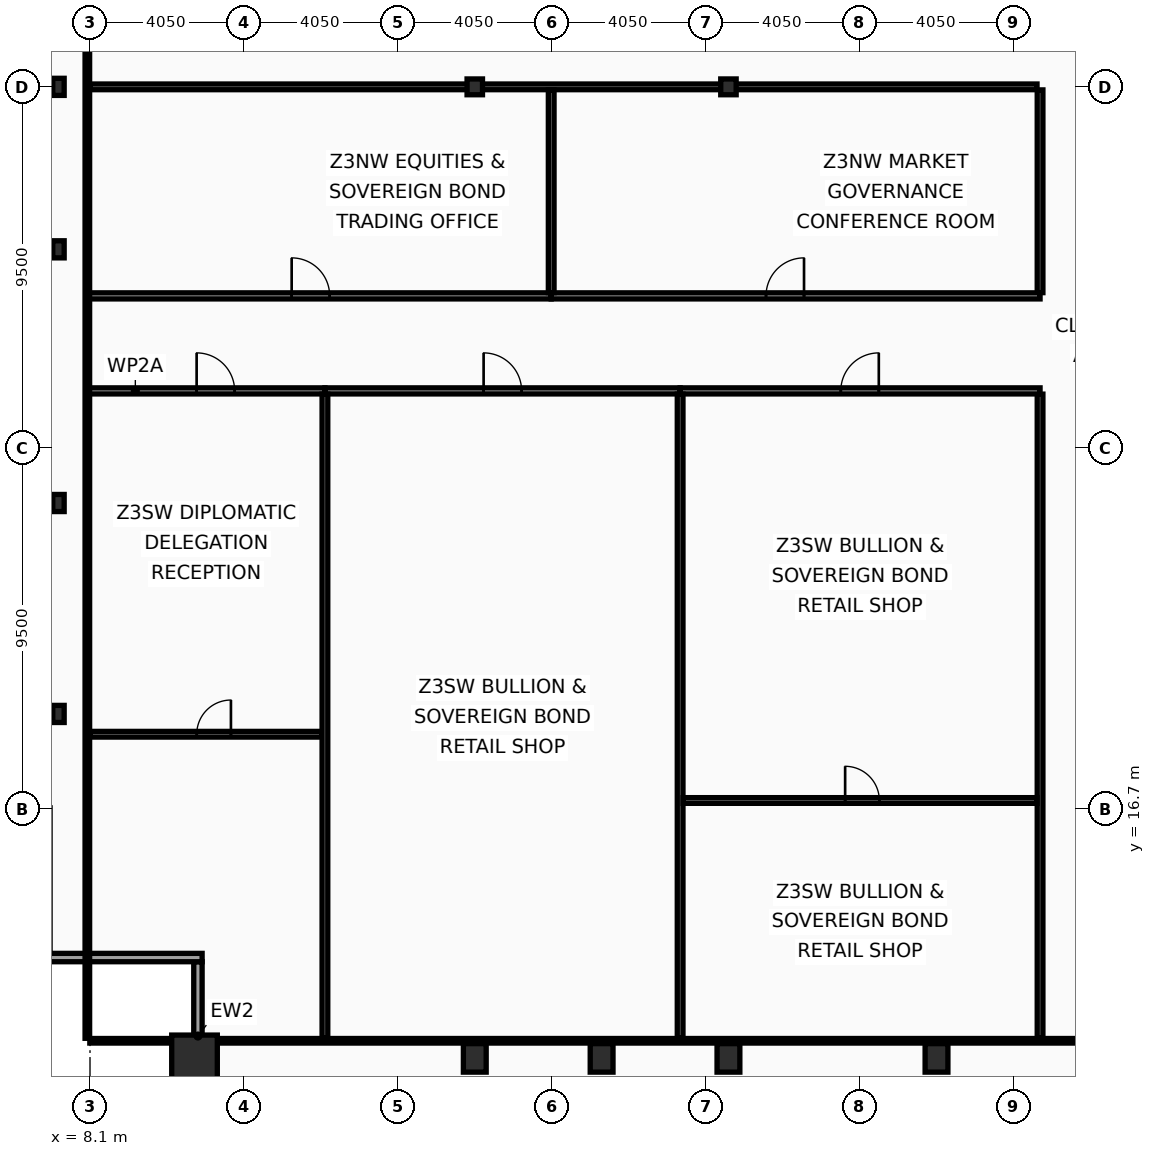
"""IFC4 building model, lengths in metres.
Left out: names, types, materials, properties, quantities, classifications, styles, units other than length and angle.
Written with IfcOpenShell. Run it as: python <this file> out.ifc"""

import sys

from ifc_helpers import new_model, si_unit, direction, frame, frame_2d, origin, origin_2d, place, context, subcontext, project, spatial, rectangle, hollow_rectangle, i_section, extrude, element, fill, save


model = new_model("IFC4")
c1 = context("Model", 3, precision=1e-05, world=origin(), true_north=direction((0.0, 1.0)))
c2 = subcontext(c1, "Body", "Model", "MODEL_VIEW")
j1 = project(units=[si_unit("LENGTHUNIT", "METRE"), si_unit("PLANEANGLEUNIT", "RADIAN")], contexts=[c1])
p1 = place(None, origin())
s1 = spatial("IfcSite", under=j1, at=p1, CompositionType="ELEMENT")
p2 = place(p1, origin())
s2 = spatial("IfcBuilding", under=s1, at=p2, CompositionType="ELEMENT")
p3 = place(p2, frame((0.0, 0.0, 210.2)))
s3 = spatial("IfcBuildingStorey", under=s2, at=p3, CompositionType="ELEMENT", Elevation=210.2)
p4 = place(p3, frame((10.85, 10.15, 0.0), z_axis=(0.0, 0.0, 1.0), x_axis=(1.0, 0.0, 0.0)))
e1 = element("IfcColumn", 1, at=p4, inside=s3, PredefinedType="COLUMN", context=c2, shape_type="SweptSolid", body=[
    extrude(hollow_rectangle(XDim=1.2, YDim=1.2, WallThickness=0.06, at=origin_2d()), origin(), (0.0, 0.0, 1.0), 3.6),
])
for number, where, z_axis, x_axis in (
    (2, (18.225, 10.15, 0.0), (0.0, 0.0, 1.0), (1.0, 0.0, 0.0)),
    (3, (21.562, 10.15, 0.0), (0.0, 0.0, 1.0), (1.0, 0.0, 0.0)),
    (4, (24.9, 10.15, 0.0), (0.0, 0.0, 1.0), (1.0, 0.0, 0.0)),
    (5, (30.375, 10.15, 0.0), (0.0, 0.0, 1.0), (1.0, 0.0, 0.0)),
):
    element("IfcColumn", number, at=place(p3, frame(where, z_axis=z_axis, x_axis=x_axis)), inside=s3, PredefinedType="COLUMN", context=c2, shape_type="SweptSolid", body=[
        extrude(hollow_rectangle(XDim=0.6, YDim=0.75, WallThickness=0.045, at=origin_2d()), origin(), (0.0, 0.0, 1.0), 3.6),
    ])
for number, where, z_axis, x_axis in (
    (6, (7.27, 19.2, 0.0), (0.0, 0.0, 1.0), (1.0, 0.0, 0.0)),
    (7, (7.27, 24.75, 0.0), (0.0, 0.0, 1.0), (1.0, 0.0, 0.0)),
    (8, (7.27, 31.425, 0.0), (0.0, 0.0, 1.0), (1.0, 0.0, 0.0)),
    (9, (7.27, 35.7, 0.0), (0.0, 0.0, 1.0), (1.0, 0.0, 0.0)),
):
    element("IfcColumn", number, at=place(p3, frame(where, z_axis=z_axis, x_axis=x_axis)), inside=s3, PredefinedType="COLUMN", context=c2, shape_type="SweptSolid", body=[
        extrude(i_section(OverallWidth=0.3, OverallDepth=0.45, WebThickness=0.014, FlangeThickness=0.026, at=origin_2d()), origin(), (0.0, 0.0, 1.0), 3.6),
    ])
for number, where, z_axis, x_axis in (
    (10, (18.225, 35.7, 0.0), (0.0, 0.0, 1.0), (1.0, 0.0, 0.0)),
    (11, (24.9, 35.7, 0.0), (0.0, 0.0, 1.0), (1.0, 0.0, 0.0)),
):
    element("IfcColumn", number, at=place(p3, frame(where, z_axis=z_axis, x_axis=x_axis)), inside=s3, PredefinedType="COLUMN", context=c2, shape_type="SweptSolid", body=[
        extrude(i_section(OverallWidth=0.406, OverallDepth=0.416, WebThickness=0.03, FlangeThickness=0.048, at=origin_2d()), origin(), (0.0, 0.0, 1.0), 3.6),
    ])
p5 = place(p3, frame((10.94, 8.77, 0.0), z_axis=(0.0, 0.0, 1.0), x_axis=(0.0, 1.0, 0.0)))
e12 = element("IfcWall", 12, at=p5, inside=s3, PredefinedType="SOLIDWALL", context=c2, shape_type="SweptSolid", body=[
    extrude(rectangle(XDim=3.91, YDim=0.22, at=frame_2d((1.955, 0.0))), origin(), (0.0, 0.0, 1.0), 2.83),
])
p6 = place(p3, frame((11.05, 12.79, 0.0), z_axis=(0.0, 0.0, 1.0), x_axis=(-1.0, 0.0, 0.0)))
e13 = element("IfcWall", 13, at=p6, inside=s3, PredefinedType="SOLIDWALL", context=c2, shape_type="SweptSolid", body=[
    extrude(rectangle(XDim=4.22, YDim=0.22, at=frame_2d((2.11, 0.0))), origin(), (0.0, 0.0, 1.0), 2.83),
])
p7 = place(p3, frame((33.1, 10.665, 0.0), z_axis=(0.0, 0.0, 1.0), x_axis=(0.0, 1.0, 0.0)))
e14 = element("IfcWall", 14, at=p7, inside=s3, PredefinedType="PARTITIONING", context=c2, shape_type="SweptSolid", body=[
    extrude(rectangle(XDim=16.95, YDim=0.15, at=frame_2d((8.475, 0.0))), origin(), (0.0, 0.0, 1.0), 2.98),
])
p8 = place(p3, frame((33.1, 30.285, 0.0), z_axis=(0.0, 0.0, 1.0), x_axis=(0.0, 1.0, 0.0)))
e15 = element("IfcWall", 15, at=p8, inside=s3, PredefinedType="PARTITIONING", context=c2, shape_type="SweptSolid", body=[
    extrude(rectangle(XDim=5.335, YDim=0.15, at=frame_2d((2.667, 0.0))), origin(), (0.0, 0.0, 1.0), 2.98),
])
p9 = place(p3, frame((8.095, 35.7, 0.0), z_axis=(0.0, 0.0, 1.0), x_axis=(1.0, 0.0, 0.0)))
e16 = element("IfcWall", 16, at=p9, inside=s3, PredefinedType="PARTITIONING", context=c2, shape_type="SweptSolid", body=[
    extrude(rectangle(XDim=24.925, YDim=0.15, at=frame_2d((12.462, 0.0))), origin(), (0.0, 0.0, 1.0), 2.73),
])
p10 = place(p3, frame((8.03, 27.7, 0.0), z_axis=(0.0, 0.0, 1.0), x_axis=(1.0, 0.0, 0.0)))
e17 = element("IfcWall", 17, at=p10, inside=s3, PredefinedType="PARTITIONING", context=c2, shape_type="SweptSolid", body=[
    extrude(rectangle(XDim=6.252, YDim=0.16, at=frame_2d((3.126, 0.0))), origin(), (0.0, 0.0, 1.0), 3.44),
])
p11 = place(p10, frame((2.876, 0.0, 0.0)))
e18 = element("IfcOpeningElement", 18, at=p11, cuts=e17, PredefinedType="OPENING", context=c2, shape_type="SweptSolid", body=[
    extrude(rectangle(XDim=1.0, YDim=2.05, at=frame_2d((0.5, 1.025))), frame((0.0, 0.09, 0.0), z_axis=(0.0, -1.0, 0.0), x_axis=(1.0, 0.0, 0.0)), (0.0, 0.0, 1.0), 0.18),
])
p12 = place(p3, frame((8.095, 18.666, 0.0), z_axis=(0.0, 0.0, 1.0), x_axis=(1.0, 0.0, 0.0)))
e19 = element("IfcWall", 19, at=p12, inside=s3, PredefinedType="PARTITIONING", context=c2, shape_type="SweptSolid", body=[
    extrude(rectangle(XDim=6.107, YDim=0.15, at=frame_2d((3.053, 0.0))), origin(), (0.0, 0.0, 1.0), 2.73),
])
p13 = place(p12, frame((2.813, 0.0, 0.0)))
e20 = element("IfcOpeningElement", 20, at=p13, cuts=e19, PredefinedType="OPENING", context=c2, shape_type="SweptSolid", body=[
    extrude(rectangle(XDim=0.9, YDim=2.05, at=frame_2d((0.45, 1.025))), frame((0.0, 0.085, 0.0), z_axis=(0.0, -1.0, 0.0), x_axis=(1.0, 0.0, 0.0)), (0.0, 0.0, 1.0), 0.17),
])
p14 = place(p3, frame((14.282, 27.7, 0.0), z_axis=(0.0, 0.0, 1.0), x_axis=(1.0, 0.0, 0.0)))
e21 = element("IfcWall", 21, at=p14, inside=s3, PredefinedType="PARTITIONING", context=c2, shape_type="SweptSolid", body=[
    extrude(rectangle(XDim=9.347, YDim=0.16, at=frame_2d((4.673, 0.0))), origin(), (0.0, 0.0, 1.0), 2.73),
])
p15 = place(p14, frame((4.176, 0.0, 0.0)))
e22 = element("IfcOpeningElement", 22, at=p15, cuts=e21, PredefinedType="OPENING", context=c2, shape_type="SweptSolid", body=[
    extrude(rectangle(XDim=1.0, YDim=2.05, at=frame_2d((0.5, 1.025))), frame((0.0, 0.09, 0.0), z_axis=(0.0, -1.0, 0.0), x_axis=(1.0, 0.0, 0.0)), (0.0, 0.0, 1.0), 0.18),
])
p16 = place(p3, frame((14.282, 10.665, 0.0), z_axis=(0.0, 0.0, 1.0), x_axis=(0.0, 1.0, 0.0)))
e23 = element("IfcWall", 23, at=p16, inside=s3, PredefinedType="PARTITIONING", context=c2, shape_type="SweptSolid", body=[
    extrude(rectangle(XDim=16.95, YDim=0.15, at=frame_2d((8.475, 0.0))), origin(), (0.0, 0.0, 1.0), 2.73),
])
p17 = place(p3, frame((23.629, 27.7, 0.0), z_axis=(0.0, 0.0, 1.0), x_axis=(1.0, 0.0, 0.0)))
e24 = element("IfcWall", 24, at=p17, inside=s3, PredefinedType="PARTITIONING", context=c2, shape_type="SweptSolid", body=[
    extrude(rectangle(XDim=9.471, YDim=0.16, at=frame_2d((4.736, 0.0))), origin(), (0.0, 0.0, 1.0), 2.73),
])
p18 = place(p17, frame((4.228, 0.0, 0.0)))
e25 = element("IfcOpeningElement", 25, at=p18, cuts=e24, PredefinedType="OPENING", context=c2, shape_type="SweptSolid", body=[
    extrude(rectangle(XDim=1.0, YDim=2.05, at=frame_2d((0.5, 1.025))), frame((0.0, 0.09, 0.0), z_axis=(0.0, -1.0, 0.0), x_axis=(1.0, 0.0, 0.0)), (0.0, 0.0, 1.0), 0.18),
])
p19 = place(p3, frame((23.629, 10.665, 0.0), z_axis=(0.0, 0.0, 1.0), x_axis=(0.0, 1.0, 0.0)))
e26 = element("IfcWall", 26, at=p19, inside=s3, PredefinedType="PARTITIONING", context=c2, shape_type="SweptSolid", body=[
    extrude(rectangle(XDim=16.95, YDim=0.15, at=frame_2d((8.475, 0.0))), origin(), (0.0, 0.0, 1.0), 2.98),
])
p20 = place(p3, frame((23.708, 16.923, 0.0), z_axis=(0.0, 0.0, 1.0), x_axis=(1.0, 0.0, 0.0)))
e27 = element("IfcWall", 27, at=p20, inside=s3, PredefinedType="PARTITIONING", context=c2, shape_type="SweptSolid", body=[
    extrude(rectangle(XDim=9.312, YDim=0.15, at=frame_2d((4.656, 0.0))), origin(), (0.0, 0.0, 1.0), 2.73),
])
p21 = place(p20, frame((4.262, 0.0, 0.0)))
e28 = element("IfcOpeningElement", 28, at=p21, cuts=e27, PredefinedType="OPENING", context=c2, shape_type="SweptSolid", body=[
    extrude(rectangle(XDim=0.9, YDim=2.05, at=frame_2d((0.45, 1.025))), frame((0.0, 0.085, 0.0), z_axis=(0.0, -1.0, 0.0), x_axis=(1.0, 0.0, 0.0)), (0.0, 0.0, 1.0), 0.17),
])
p22 = place(p3, frame((8.03, 30.2, 0.0), z_axis=(0.0, 0.0, 1.0), x_axis=(1.0, 0.0, 0.0)))
e29 = element("IfcWall", 29, at=p22, inside=s3, PredefinedType="PARTITIONING", context=c2, shape_type="SweptSolid", body=[
    extrude(rectangle(XDim=12.206, YDim=0.16, at=frame_2d((6.103, 0.0))), origin(), (0.0, 0.0, 1.0), 2.73),
])
p23 = place(p22, frame((5.376, 0.0, 0.0)))
e30 = element("IfcOpeningElement", 30, at=p23, cuts=e29, PredefinedType="OPENING", context=c2, shape_type="SweptSolid", body=[
    extrude(rectangle(XDim=1.0, YDim=2.05, at=frame_2d((0.5, 1.025))), frame((0.0, 0.09, 0.0), z_axis=(0.0, -1.0, 0.0), x_axis=(1.0, 0.0, 0.0)), (0.0, 0.0, 1.0), 0.18),
])
p24 = place(p3, frame((20.236, 30.2, 0.0), z_axis=(0.0, 0.0, 1.0), x_axis=(1.0, 0.0, 0.0)))
e31 = element("IfcWall", 31, at=p24, inside=s3, PredefinedType="PARTITIONING", context=c2, shape_type="SweptSolid", body=[
    extrude(rectangle(XDim=12.864, YDim=0.16, at=frame_2d((6.432, 0.0))), origin(), (0.0, 0.0, 1.0), 2.73),
])
p25 = place(p24, frame((5.653, 0.0, 0.0)))
e32 = element("IfcOpeningElement", 32, at=p25, cuts=e31, PredefinedType="OPENING", context=c2, shape_type="SweptSolid", body=[
    extrude(rectangle(XDim=1.0, YDim=2.05, at=frame_2d((0.5, 1.025))), frame((0.0, 0.09, 0.0), z_axis=(0.0, -1.0, 0.0), x_axis=(1.0, 0.0, 0.0)), (0.0, 0.0, 1.0), 0.18),
])
p26 = place(p3, frame((20.236, 30.285, 0.0), z_axis=(0.0, 0.0, 1.0), x_axis=(0.0, 1.0, 0.0)))
e33 = element("IfcWall", 33, at=p26, inside=s3, PredefinedType="PARTITIONING", context=c2, shape_type="SweptSolid", body=[
    extrude(rectangle(XDim=5.335, YDim=0.15, at=frame_2d((2.667, 0.0))), origin(), (0.0, 0.0, 1.0), 2.98),
])
p27 = place(p3, frame((8.03, 10.665, 0.0), z_axis=(0.0, 0.0, 1.0), x_axis=(0.0, 1.0, 0.0)))
e34 = element("IfcWall", 34, at=p27, inside=s3, PredefinedType="PARTITIONING", context=c2, shape_type="SweptSolid", body=[
    extrude(rectangle(XDim=42.11, YDim=0.12, at=frame_2d((21.055, 0.0))), origin(), (0.0, 0.0, 1.0), 2.73),
])
p28 = place(p3, frame((8.095, 10.6, 0.0), z_axis=(0.0, 0.0, 1.0), x_axis=(1.0, 0.0, 0.0)))
e35 = element("IfcWall", 35, at=p28, inside=s3, PredefinedType="PARTITIONING", context=c2, shape_type="SweptSolid", body=[
    extrude(rectangle(XDim=56.71, YDim=0.12, at=frame_2d((28.355, 0.0))), origin(), (0.0, 0.0, 1.0), 2.73),
])
p29 = place(p11, origin())
e36 = element("IfcDoor", 36, at=p29, inside=s3, OperationType="SINGLE_SWING_LEFT", PredefinedType="DOOR", context=c2, shape_type="SweptSolid", body=[
    extrude(rectangle(XDim=1.0, YDim=2.05, at=frame_2d((0.5, 1.025))), frame((0.0, 0.025, 0.0), z_axis=(0.0, -1.0, 0.0), x_axis=(1.0, 0.0, 0.0)), (0.0, 0.0, 1.0), 0.05),
])
fill(e18, e36)
p30 = place(p13, origin())
e37 = element("IfcDoor", 37, at=p30, inside=s3, OperationType="SINGLE_SWING_RIGHT", PredefinedType="DOOR", context=c2, shape_type="SweptSolid", body=[
    extrude(rectangle(XDim=0.9, YDim=2.05, at=frame_2d((0.45, 1.025))), frame((0.0, 0.025, 0.0), z_axis=(0.0, -1.0, 0.0), x_axis=(1.0, 0.0, 0.0)), (0.0, 0.0, 1.0), 0.05),
])
fill(e20, e37)
p31 = place(p15, origin())
e38 = element("IfcDoor", 38, at=p31, inside=s3, OperationType="SINGLE_SWING_LEFT", PredefinedType="DOOR", context=c2, shape_type="SweptSolid", body=[
    extrude(rectangle(XDim=1.0, YDim=2.05, at=frame_2d((0.5, 1.025))), frame((0.0, 0.025, 0.0), z_axis=(0.0, -1.0, 0.0), x_axis=(1.0, 0.0, 0.0)), (0.0, 0.0, 1.0), 0.05),
])
fill(e22, e38)
p32 = place(p18, origin())
e39 = element("IfcDoor", 39, at=p32, inside=s3, OperationType="SINGLE_SWING_RIGHT", PredefinedType="DOOR", context=c2, shape_type="SweptSolid", body=[
    extrude(rectangle(XDim=1.0, YDim=2.05, at=frame_2d((0.5, 1.025))), frame((0.0, 0.025, 0.0), z_axis=(0.0, -1.0, 0.0), x_axis=(1.0, 0.0, 0.0)), (0.0, 0.0, 1.0), 0.05),
])
fill(e25, e39)
p33 = place(p21, origin())
e40 = element("IfcDoor", 40, at=p33, inside=s3, OperationType="SINGLE_SWING_LEFT", PredefinedType="DOOR", context=c2, shape_type="SweptSolid", body=[
    extrude(rectangle(XDim=0.9, YDim=2.05, at=frame_2d((0.45, 1.025))), frame((0.0, 0.025, 0.0), z_axis=(0.0, -1.0, 0.0), x_axis=(1.0, 0.0, 0.0)), (0.0, 0.0, 1.0), 0.05),
])
fill(e28, e40)
p34 = place(p23, origin())
e41 = element("IfcDoor", 41, at=p34, inside=s3, OperationType="SINGLE_SWING_LEFT", PredefinedType="DOOR", context=c2, shape_type="SweptSolid", body=[
    extrude(rectangle(XDim=1.0, YDim=2.05, at=frame_2d((0.5, 1.025))), frame((0.0, 0.025, 0.0), z_axis=(0.0, -1.0, 0.0), x_axis=(1.0, 0.0, 0.0)), (0.0, 0.0, 1.0), 0.05),
])
fill(e30, e41)
p35 = place(p25, origin())
e42 = element("IfcDoor", 42, at=p35, inside=s3, OperationType="SINGLE_SWING_RIGHT", PredefinedType="DOOR", context=c2, shape_type="SweptSolid", body=[
    extrude(rectangle(XDim=1.0, YDim=2.05, at=frame_2d((0.5, 1.025))), frame((0.0, 0.025, 0.0), z_axis=(0.0, -1.0, 0.0), x_axis=(1.0, 0.0, 0.0)), (0.0, 0.0, 1.0), 0.05),
])
fill(e32, e42)
save(model, sys.argv[1])
